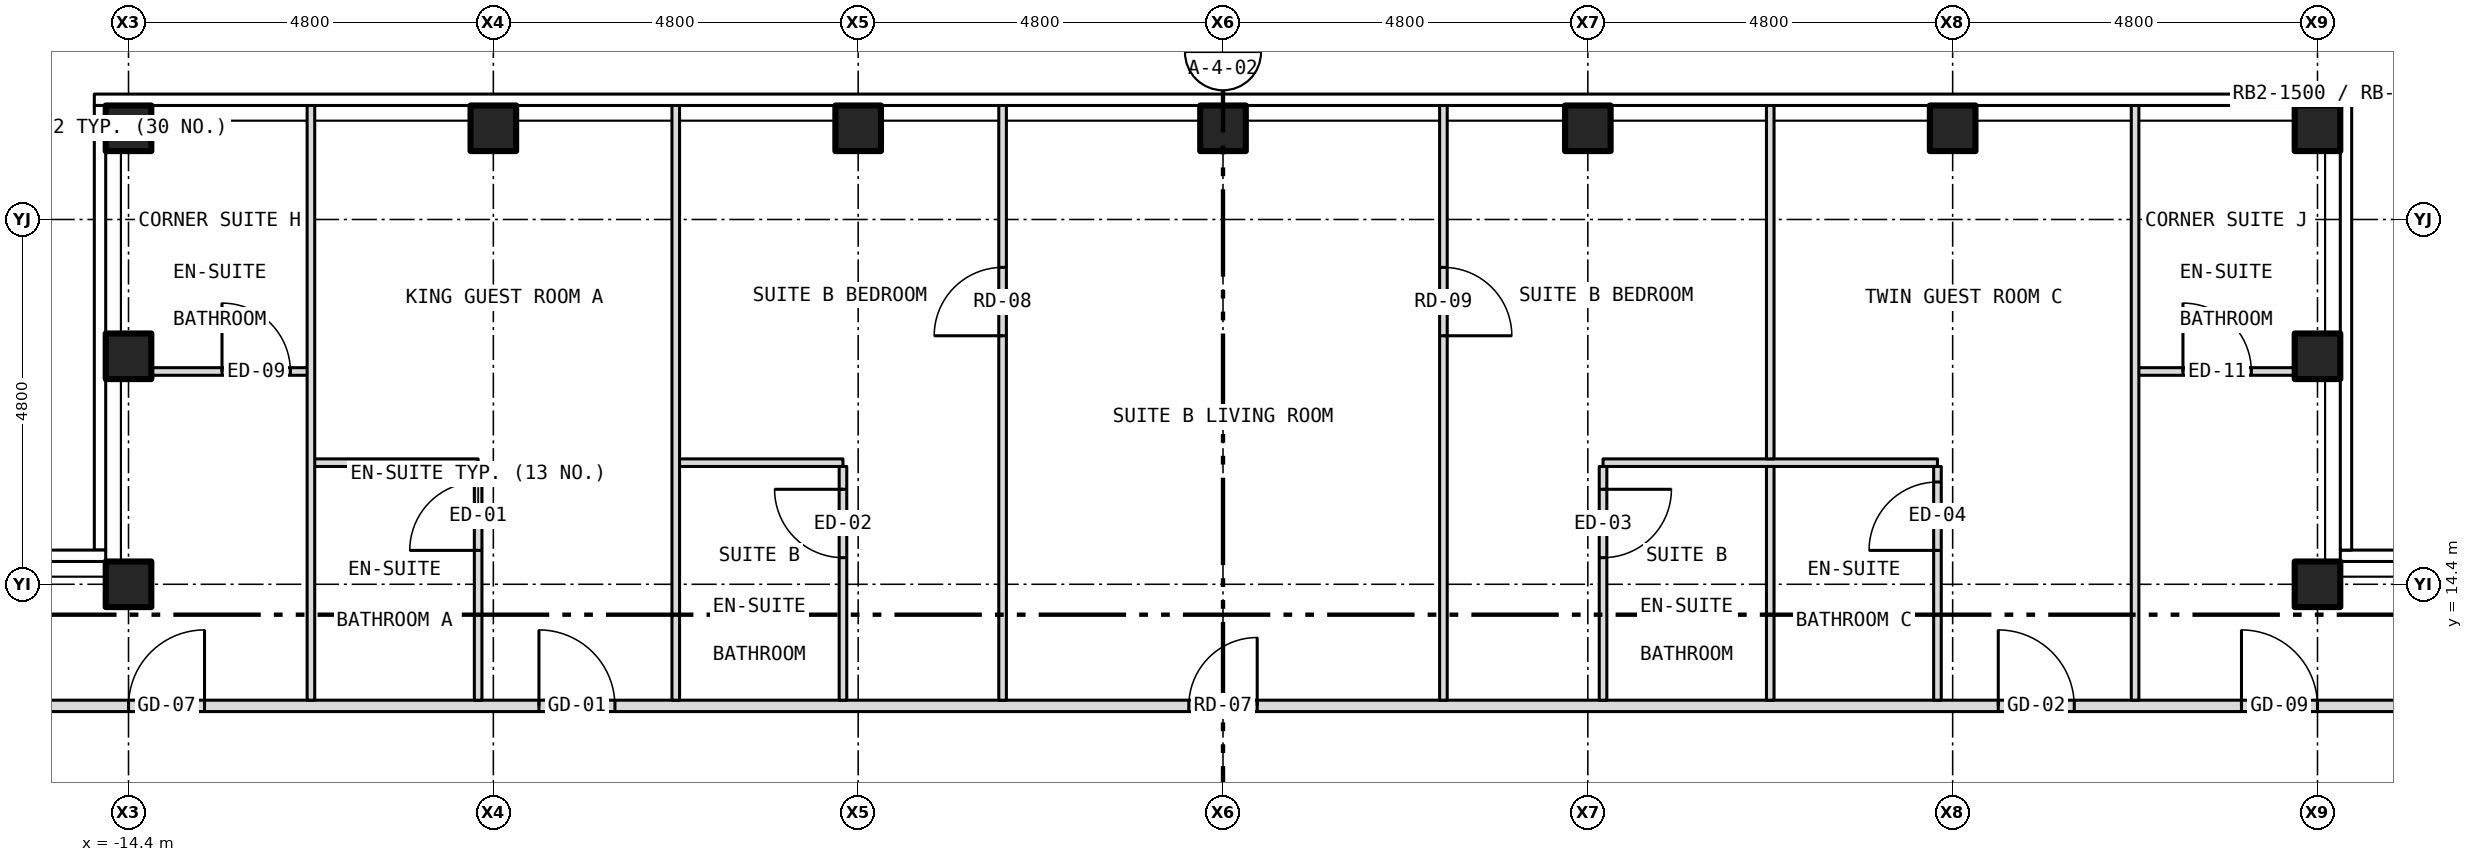
"""IFC4 building model, lengths in metres.
Left out: names, types, materials, properties, quantities, classifications, styles, units other than length and angle.
Written with IfcOpenShell. Run it as: python <this file> out.ifc"""

import sys

from ifc_helpers import new_model, si_unit, direction, frame, frame_2d, origin, origin_2d, place, context, subcontext, project, spatial, rectangle, hollow_rectangle, extrude, element, fill, save


model = new_model("IFC4")
c1 = context("Model", 3, precision=1e-05, world=origin(), true_north=direction((0.0, 1.0)))
c2 = subcontext(c1, "Body", "Model", "MODEL_VIEW")
j1 = project(units=[si_unit("LENGTHUNIT", "METRE"), si_unit("PLANEANGLEUNIT", "RADIAN")], contexts=[c1])
p1 = place(None, origin())
s1 = spatial("IfcSite", under=j1, at=p1, CompositionType="ELEMENT")
p2 = place(p1, origin())
s2 = spatial("IfcBuilding", under=s1, at=p2, CompositionType="ELEMENT")
p3 = place(p2, frame((0.0, 0.0, 241.0)))
s3 = spatial("IfcBuildingStorey", under=s2, at=p3, CompositionType="ELEMENT", Elevation=241.0)
for number, where, z_axis, x_axis in (
    (1, (-14.4, 20.4, -0.15), (0.0, 0.0, 1.0), (1.0, 0.0, 0.0)),
    (2, (-9.6, 20.4, -0.15), (0.0, 0.0, 1.0), (1.0, 0.0, 0.0)),
    (3, (-4.8, 20.4, -0.15), (0.0, 0.0, 1.0), (1.0, 0.0, 0.0)),
    (4, (0.0, 20.4, -0.15), (0.0, 0.0, 1.0), (1.0, 0.0, 0.0)),
    (5, (4.8, 20.4, -0.15), (0.0, 0.0, 1.0), (1.0, 0.0, 0.0)),
    (6, (9.6, 20.4, -0.15), (0.0, 0.0, 1.0), (1.0, 0.0, 0.0)),
    (7, (14.4, 20.4, -0.15), (0.0, 0.0, 1.0), (1.0, 0.0, 0.0)),
    (8, (-14.4, 14.4, -0.15), (0.0, 0.0, 1.0), (1.0, 0.0, 0.0)),
    (9, (-14.4, 17.4, -0.15), (0.0, 0.0, 1.0), (1.0, 0.0, 0.0)),
    (10, (14.4, 14.4, -0.15), (0.0, 0.0, 1.0), (1.0, 0.0, 0.0)),
    (11, (14.4, 17.4, -0.15), (0.0, 0.0, 1.0), (1.0, 0.0, 0.0)),
):
    element("IfcColumn", number, at=place(p3, frame(where, z_axis=z_axis, x_axis=x_axis)), inside=s3, PredefinedType="COLUMN", context=c2, shape_type="SweptSolid", body=[
        extrude(hollow_rectangle(XDim=0.6, YDim=0.6, WallThickness=0.03, at=origin_2d()), origin(), (0.0, 0.0, 1.0), 3.5),
    ])
p4 = place(p3, frame((-15.8, 12.8, 0.0), z_axis=(0.0, 0.0, 1.0), x_axis=(1.0, 0.0, 0.0)))
e12 = element("IfcWall", 12, at=p4, inside=s3, PredefinedType="PARTITIONING", context=c2, shape_type="SweptSolid", body=[
    extrude(rectangle(XDim=31.6, YDim=0.15, at=frame_2d((15.8, 0.0))), origin(), (0.0, 0.0, 1.0), 3.35),
])
p5 = place(p4, frame((6.8, 0.0, 0.0)))
e13 = element("IfcOpeningElement", 13, at=p5, cuts=e12, PredefinedType="OPENING", context=c2, shape_type="SweptSolid", body=[
    extrude(rectangle(XDim=1.0, YDim=2.1, at=frame_2d((0.5, 1.05))), frame((0.0, 0.087, 0.0), z_axis=(0.0, -1.0, 0.0), x_axis=(1.0, 0.0, 0.0)), (0.0, 0.0, 1.0), 0.174),
])
p6 = place(p4, frame((15.35, 0.0, 0.0)))
e14 = element("IfcOpeningElement", 14, at=p6, cuts=e12, PredefinedType="OPENING", context=c2, shape_type="SweptSolid", body=[
    extrude(rectangle(XDim=0.9, YDim=2.1, at=frame_2d((0.45, 1.05))), frame((0.0, 0.087, 0.0), z_axis=(0.0, -1.0, 0.0), x_axis=(1.0, 0.0, 0.0)), (0.0, 0.0, 1.0), 0.174),
])
p7 = place(p4, frame((26.0, 0.0, 0.0)))
e15 = element("IfcOpeningElement", 15, at=p7, cuts=e12, PredefinedType="OPENING", context=c2, shape_type="SweptSolid", body=[
    extrude(rectangle(XDim=1.0, YDim=2.1, at=frame_2d((0.5, 1.05))), frame((0.0, 0.087, 0.0), z_axis=(0.0, -1.0, 0.0), x_axis=(1.0, 0.0, 0.0)), (0.0, 0.0, 1.0), 0.174),
])
p8 = place(p4, frame((1.4, 0.0, 0.0)))
e16 = element("IfcOpeningElement", 16, at=p8, cuts=e12, PredefinedType="OPENING", context=c2, shape_type="SweptSolid", body=[
    extrude(rectangle(XDim=1.0, YDim=2.1, at=frame_2d((0.5, 1.05))), frame((0.0, 0.087, 0.0), z_axis=(0.0, -1.0, 0.0), x_axis=(1.0, 0.0, 0.0)), (0.0, 0.0, 1.0), 0.174),
])
p9 = place(p4, frame((29.2, 0.0, 0.0)))
e17 = element("IfcOpeningElement", 17, at=p9, cuts=e12, PredefinedType="OPENING", context=c2, shape_type="SweptSolid", body=[
    extrude(rectangle(XDim=1.0, YDim=2.1, at=frame_2d((0.5, 1.05))), frame((0.0, 0.087, 0.0), z_axis=(0.0, -1.0, 0.0), x_axis=(1.0, 0.0, 0.0)), (0.0, 0.0, 1.0), 0.174),
])
for number, where, z_axis, x_axis in (
    (18, (-12.0, 16.0, 0.0), (0.0, 0.0, 1.0), (1.0, 0.0, 0.0)),
    (19, (-7.2, 16.0, 0.0), (0.0, 0.0, 1.0), (1.0, 0.0, 0.0)),
):
    element("IfcWall", number, at=place(p3, frame(where, z_axis=z_axis, x_axis=x_axis)), inside=s3, PredefinedType="PARTITIONING", context=c2, shape_type="SweptSolid", body=[
        extrude(rectangle(XDim=2.2, YDim=0.1, at=frame_2d((1.1, 0.0))), origin(), (0.0, 0.0, 1.0), 3.35),
    ])
p10 = place(p3, frame((5.0, 16.0, 0.0), z_axis=(0.0, 0.0, 1.0), x_axis=(1.0, 0.0, 0.0)))
e20 = element("IfcWall", 20, at=p10, inside=s3, PredefinedType="PARTITIONING", context=c2, shape_type="SweptSolid", body=[
    extrude(rectangle(XDim=4.4, YDim=0.1, at=frame_2d((2.2, 0.0))), origin(), (0.0, 0.0, 1.0), 3.35),
])
p11 = place(p3, frame((-14.28, 17.2, 0.0), z_axis=(0.0, 0.0, 1.0), x_axis=(1.0, 0.0, 0.0)))
e21 = element("IfcWall", 21, at=p11, inside=s3, PredefinedType="PARTITIONING", context=c2, shape_type="SweptSolid", body=[
    extrude(rectangle(XDim=2.28, YDim=0.1, at=frame_2d((1.14, 0.0))), origin(), (0.0, 0.0, 1.0), 3.35),
])
p12 = place(p11, frame((1.11, 0.0, 0.0)))
e22 = element("IfcOpeningElement", 22, at=p12, cuts=e21, PredefinedType="OPENING", context=c2, shape_type="SweptSolid", body=[
    extrude(rectangle(XDim=0.9, YDim=2.1, at=frame_2d((0.45, 1.05))), frame((0.0, 0.062, 0.0), z_axis=(0.0, -1.0, 0.0), x_axis=(1.0, 0.0, 0.0)), (0.0, 0.0, 1.0), 0.124),
])
p13 = place(p3, frame((12.0, 17.2, 0.0), z_axis=(0.0, 0.0, 1.0), x_axis=(1.0, 0.0, 0.0)))
e23 = element("IfcWall", 23, at=p13, inside=s3, PredefinedType="PARTITIONING", context=c2, shape_type="SweptSolid", body=[
    extrude(rectangle(XDim=2.28, YDim=0.1, at=frame_2d((1.14, 0.0))), origin(), (0.0, 0.0, 1.0), 3.35),
])
p14 = place(p13, frame((0.63, 0.0, 0.0)))
e24 = element("IfcOpeningElement", 24, at=p14, cuts=e23, PredefinedType="OPENING", context=c2, shape_type="SweptSolid", body=[
    extrude(rectangle(XDim=0.9, YDim=2.1, at=frame_2d((0.45, 1.05))), frame((0.0, 0.062, 0.0), z_axis=(0.0, -1.0, 0.0), x_axis=(1.0, 0.0, 0.0)), (0.0, 0.0, 1.0), 0.124),
])
p15 = place(p3, frame((-12.0, 12.875, 0.0), z_axis=(0.0, 0.0, 1.0), x_axis=(0.0, 1.0, 0.0)))
e25 = element("IfcWall", 25, at=p15, inside=s3, PredefinedType="PARTITIONING", context=c2, shape_type="SweptSolid", body=[
    extrude(rectangle(XDim=7.855, YDim=0.1, at=frame_2d((3.927, 0.0))), origin(), (0.0, 0.0, 1.0), 3.35),
])
p16 = place(p3, frame((-9.8, 12.875, 0.0), z_axis=(0.0, 0.0, 1.0), x_axis=(0.0, 1.0, 0.0)))
e26 = element("IfcWall", 26, at=p16, inside=s3, PredefinedType="PARTITIONING", context=c2, shape_type="SweptSolid", body=[
    extrude(rectangle(XDim=3.075, YDim=0.1, at=frame_2d((1.538, 0.0))), origin(), (0.0, 0.0, 1.0), 2.728),
])
p17 = place(p16, frame((1.971, 0.0, 0.0)))
e27 = element("IfcOpeningElement", 27, at=p17, cuts=e26, PredefinedType="OPENING", context=c2, shape_type="SweptSolid", body=[
    extrude(rectangle(XDim=0.9, YDim=2.1, at=frame_2d((0.45, 1.05))), frame((0.0, 0.062, 0.0), z_axis=(0.0, -1.0, 0.0), x_axis=(1.0, 0.0, 0.0)), (0.0, 0.0, 1.0), 0.124),
])
p18 = place(p3, frame((-7.2, 12.875, 0.0), z_axis=(0.0, 0.0, 1.0), x_axis=(0.0, 1.0, 0.0)))
e28 = element("IfcWall", 28, at=p18, inside=s3, PredefinedType="PARTITIONING", context=c2, shape_type="SweptSolid", body=[
    extrude(rectangle(XDim=7.855, YDim=0.1, at=frame_2d((3.927, 0.0))), origin(), (0.0, 0.0, 1.0), 3.35),
])
p19 = place(p3, frame((-5.0, 12.875, 0.0), z_axis=(0.0, 0.0, 1.0), x_axis=(0.0, 1.0, 0.0)))
e29 = element("IfcWall", 29, at=p19, inside=s3, PredefinedType="PARTITIONING", context=c2, shape_type="SweptSolid", body=[
    extrude(rectangle(XDim=3.075, YDim=0.1, at=frame_2d((1.538, 0.0))), origin(), (0.0, 0.0, 1.0), 3.35),
])
p20 = place(p19, frame((1.875, 0.0, 0.0)))
e30 = element("IfcOpeningElement", 30, at=p20, cuts=e29, PredefinedType="OPENING", context=c2, shape_type="SweptSolid", body=[
    extrude(rectangle(XDim=0.9, YDim=2.1, at=frame_2d((0.45, 1.05))), frame((0.0, 0.062, 0.0), z_axis=(0.0, -1.0, 0.0), x_axis=(1.0, 0.0, 0.0)), (0.0, 0.0, 1.0), 0.124),
])
p21 = place(p3, frame((-2.9, 12.875, 0.0), z_axis=(0.0, 0.0, 1.0), x_axis=(0.0, 1.0, 0.0)))
e31 = element("IfcWall", 31, at=p21, inside=s3, PredefinedType="PARTITIONING", context=c2, shape_type="SweptSolid", body=[
    extrude(rectangle(XDim=7.855, YDim=0.1, at=frame_2d((3.927, 0.0))), origin(), (0.0, 0.0, 1.0), 3.35),
])
p22 = place(p21, frame((4.795, 0.0, 0.0)))
e32 = element("IfcOpeningElement", 32, at=p22, cuts=e31, PredefinedType="OPENING", context=c2, shape_type="SweptSolid", body=[
    extrude(rectangle(XDim=0.9, YDim=2.1, at=frame_2d((0.45, 1.05))), frame((0.0, 0.062, 0.0), z_axis=(0.0, -1.0, 0.0), x_axis=(1.0, 0.0, 0.0)), (0.0, 0.0, 1.0), 0.124),
])
p23 = place(p3, frame((2.9, 12.875, 0.0), z_axis=(0.0, 0.0, 1.0), x_axis=(0.0, 1.0, 0.0)))
e33 = element("IfcWall", 33, at=p23, inside=s3, PredefinedType="PARTITIONING", context=c2, shape_type="SweptSolid", body=[
    extrude(rectangle(XDim=7.855, YDim=0.1, at=frame_2d((3.927, 0.0))), origin(), (0.0, 0.0, 1.0), 3.35),
])
p24 = place(p23, frame((4.795, 0.0, 0.0)))
e34 = element("IfcOpeningElement", 34, at=p24, cuts=e33, PredefinedType="OPENING", context=c2, shape_type="SweptSolid", body=[
    extrude(rectangle(XDim=0.9, YDim=2.1, at=frame_2d((0.45, 1.05))), frame((0.0, 0.062, 0.0), z_axis=(0.0, -1.0, 0.0), x_axis=(1.0, 0.0, 0.0)), (0.0, 0.0, 1.0), 0.124),
])
p25 = place(p3, frame((5.0, 12.875, 0.0), z_axis=(0.0, 0.0, 1.0), x_axis=(0.0, 1.0, 0.0)))
e35 = element("IfcWall", 35, at=p25, inside=s3, PredefinedType="PARTITIONING", context=c2, shape_type="SweptSolid", body=[
    extrude(rectangle(XDim=3.075, YDim=0.1, at=frame_2d((1.538, 0.0))), origin(), (0.0, 0.0, 1.0), 3.35),
])
p26 = place(p25, frame((1.875, 0.0, 0.0)))
e36 = element("IfcOpeningElement", 36, at=p26, cuts=e35, PredefinedType="OPENING", context=c2, shape_type="SweptSolid", body=[
    extrude(rectangle(XDim=0.9, YDim=2.1, at=frame_2d((0.45, 1.05))), frame((0.0, 0.062, 0.0), z_axis=(0.0, -1.0, 0.0), x_axis=(1.0, 0.0, 0.0)), (0.0, 0.0, 1.0), 0.124),
])
p27 = place(p3, frame((7.2, 12.875, 0.0), z_axis=(0.0, 0.0, 1.0), x_axis=(0.0, 1.0, 0.0)))
e37 = element("IfcWall", 37, at=p27, inside=s3, PredefinedType="PARTITIONING", context=c2, shape_type="SweptSolid", body=[
    extrude(rectangle(XDim=3.075, YDim=0.1, at=frame_2d((1.538, 0.0))), origin(), (0.0, 0.0, 1.0), 3.35),
])
p28 = place(p3, frame((7.2, 16.05, 0.0), z_axis=(0.0, 0.0, 1.0), x_axis=(0.0, 1.0, 0.0)))
e38 = element("IfcWall", 38, at=p28, inside=s3, PredefinedType="PARTITIONING", context=c2, shape_type="SweptSolid", body=[
    extrude(rectangle(XDim=4.68, YDim=0.1, at=frame_2d((2.34, 0.0))), origin(), (0.0, 0.0, 1.0), 3.35),
])
p29 = place(p3, frame((9.4, 12.875, 0.0), z_axis=(0.0, 0.0, 1.0), x_axis=(0.0, 1.0, 0.0)))
e39 = element("IfcWall", 39, at=p29, inside=s3, PredefinedType="PARTITIONING", context=c2, shape_type="SweptSolid", body=[
    extrude(rectangle(XDim=3.075, YDim=0.1, at=frame_2d((1.538, 0.0))), origin(), (0.0, 0.0, 1.0), 2.728),
])
p30 = place(p29, frame((1.971, 0.0, 0.0)))
e40 = element("IfcOpeningElement", 40, at=p30, cuts=e39, PredefinedType="OPENING", context=c2, shape_type="SweptSolid", body=[
    extrude(rectangle(XDim=0.9, YDim=2.1, at=frame_2d((0.45, 1.05))), frame((0.0, 0.062, 0.0), z_axis=(0.0, -1.0, 0.0), x_axis=(1.0, 0.0, 0.0)), (0.0, 0.0, 1.0), 0.124),
])
p31 = place(p3, frame((12.0, 12.875, 0.0), z_axis=(0.0, 0.0, 1.0), x_axis=(0.0, 1.0, 0.0)))
e41 = element("IfcWall", 41, at=p31, inside=s3, PredefinedType="PARTITIONING", context=c2, shape_type="SweptSolid", body=[
    extrude(rectangle(XDim=7.855, YDim=0.1, at=frame_2d((3.927, 0.0))), origin(), (0.0, 0.0, 1.0), 3.35),
])
p32 = place(p5, origin())
e42 = element("IfcDoor", 42, at=p32, inside=s3, OperationType="SINGLE_SWING_LEFT", PredefinedType="DOOR", context=c2, shape_type="SweptSolid", body=[
    extrude(rectangle(XDim=1.0, YDim=2.1, at=frame_2d((0.5, 1.05))), frame((0.0, 0.025, 0.0), z_axis=(0.0, -1.0, 0.0), x_axis=(1.0, 0.0, 0.0)), (0.0, 0.0, 1.0), 0.05),
])
fill(e13, e42)
p33 = place(p17, origin())
e43 = element("IfcDoor", 43, at=p33, inside=s3, OperationType="SINGLE_SWING_LEFT", PredefinedType="DOOR", context=c2, shape_type="SweptSolid", body=[
    extrude(rectangle(XDim=0.9, YDim=2.1, at=frame_2d((0.45, 1.05))), frame((0.0, 0.025, 0.0), z_axis=(0.0, -1.0, 0.0), x_axis=(1.0, 0.0, 0.0)), (0.0, 0.0, 1.0), 0.05),
])
fill(e27, e43)
p34 = place(p6, origin())
e44 = element("IfcDoor", 44, at=p34, inside=s3, OperationType="SINGLE_SWING_RIGHT", PredefinedType="DOOR", context=c2, shape_type="SweptSolid", body=[
    extrude(rectangle(XDim=0.9, YDim=2.1, at=frame_2d((0.45, 1.05))), frame((0.0, 0.025, 0.0), z_axis=(0.0, -1.0, 0.0), x_axis=(1.0, 0.0, 0.0)), (0.0, 0.0, 1.0), 0.05),
])
fill(e14, e44)
p35 = place(p22, origin())
e45 = element("IfcDoor", 45, at=p35, inside=s3, OperationType="SINGLE_SWING_LEFT", PredefinedType="DOOR", context=c2, shape_type="SweptSolid", body=[
    extrude(rectangle(XDim=0.9, YDim=2.1, at=frame_2d((0.45, 1.05))), frame((0.0, 0.025, 0.0), z_axis=(0.0, -1.0, 0.0), x_axis=(1.0, 0.0, 0.0)), (0.0, 0.0, 1.0), 0.05),
])
fill(e32, e45)
p36 = place(p20, origin())
e46 = element("IfcDoor", 46, at=p36, inside=s3, OperationType="SINGLE_SWING_RIGHT", PredefinedType="DOOR", context=c2, shape_type="SweptSolid", body=[
    extrude(rectangle(XDim=0.9, YDim=2.1, at=frame_2d((0.45, 1.05))), frame((0.0, 0.025, 0.0), z_axis=(0.0, -1.0, 0.0), x_axis=(1.0, 0.0, 0.0)), (0.0, 0.0, 1.0), 0.05),
])
fill(e30, e46)
p37 = place(p24, origin())
e47 = element("IfcDoor", 47, at=p37, inside=s3, OperationType="SINGLE_SWING_LEFT", PredefinedType="DOOR", context=c2, shape_type="SweptSolid", body=[
    extrude(rectangle(XDim=0.9, YDim=2.1, at=frame_2d((0.45, 1.05))), frame((0.0, 0.025, 0.0), z_axis=(0.0, -1.0, 0.0), x_axis=(1.0, 0.0, 0.0)), (0.0, 0.0, 1.0), 0.05),
])
fill(e34, e47)
p38 = place(p26, origin())
e48 = element("IfcDoor", 48, at=p38, inside=s3, OperationType="SINGLE_SWING_RIGHT", PredefinedType="DOOR", context=c2, shape_type="SweptSolid", body=[
    extrude(rectangle(XDim=0.9, YDim=2.1, at=frame_2d((0.45, 1.05))), frame((0.0, 0.025, 0.0), z_axis=(0.0, -1.0, 0.0), x_axis=(1.0, 0.0, 0.0)), (0.0, 0.0, 1.0), 0.05),
])
fill(e36, e48)
p39 = place(p7, origin())
e49 = element("IfcDoor", 49, at=p39, inside=s3, OperationType="SINGLE_SWING_LEFT", PredefinedType="DOOR", context=c2, shape_type="SweptSolid", body=[
    extrude(rectangle(XDim=1.0, YDim=2.1, at=frame_2d((0.5, 1.05))), frame((0.0, 0.025, 0.0), z_axis=(0.0, -1.0, 0.0), x_axis=(1.0, 0.0, 0.0)), (0.0, 0.0, 1.0), 0.05),
])
fill(e15, e49)
p40 = place(p30, origin())
e50 = element("IfcDoor", 50, at=p40, inside=s3, OperationType="SINGLE_SWING_LEFT", PredefinedType="DOOR", context=c2, shape_type="SweptSolid", body=[
    extrude(rectangle(XDim=0.9, YDim=2.1, at=frame_2d((0.45, 1.05))), frame((0.0, 0.025, 0.0), z_axis=(0.0, -1.0, 0.0), x_axis=(1.0, 0.0, 0.0)), (0.0, 0.0, 1.0), 0.05),
])
fill(e40, e50)
p41 = place(p12, origin())
e51 = element("IfcDoor", 51, at=p41, inside=s3, OperationType="SINGLE_SWING_LEFT", PredefinedType="DOOR", context=c2, shape_type="SweptSolid", body=[
    extrude(rectangle(XDim=0.9, YDim=2.1, at=frame_2d((0.45, 1.05))), frame((0.0, 0.025, 0.0), z_axis=(0.0, -1.0, 0.0), x_axis=(1.0, 0.0, 0.0)), (0.0, 0.0, 1.0), 0.05),
])
fill(e22, e51)
p42 = place(p8, origin())
e52 = element("IfcDoor", 52, at=p42, inside=s3, OperationType="SINGLE_SWING_RIGHT", PredefinedType="DOOR", context=c2, shape_type="SweptSolid", body=[
    extrude(rectangle(XDim=1.0, YDim=2.1, at=frame_2d((0.5, 1.05))), frame((0.0, 0.025, 0.0), z_axis=(0.0, -1.0, 0.0), x_axis=(1.0, 0.0, 0.0)), (0.0, 0.0, 1.0), 0.05),
])
fill(e16, e52)
p43 = place(p14, origin())
e53 = element("IfcDoor", 53, at=p43, inside=s3, OperationType="SINGLE_SWING_LEFT", PredefinedType="DOOR", context=c2, shape_type="SweptSolid", body=[
    extrude(rectangle(XDim=0.9, YDim=2.1, at=frame_2d((0.45, 1.05))), frame((0.0, 0.025, 0.0), z_axis=(0.0, -1.0, 0.0), x_axis=(1.0, 0.0, 0.0)), (0.0, 0.0, 1.0), 0.05),
])
fill(e24, e53)
p44 = place(p9, origin())
e54 = element("IfcDoor", 54, at=p44, inside=s3, OperationType="SINGLE_SWING_LEFT", PredefinedType="DOOR", context=c2, shape_type="SweptSolid", body=[
    extrude(rectangle(XDim=1.0, YDim=2.1, at=frame_2d((0.5, 1.05))), frame((0.0, 0.025, 0.0), z_axis=(0.0, -1.0, 0.0), x_axis=(1.0, 0.0, 0.0)), (0.0, 0.0, 1.0), 0.05),
])
fill(e17, e54)
save(model, sys.argv[1])
